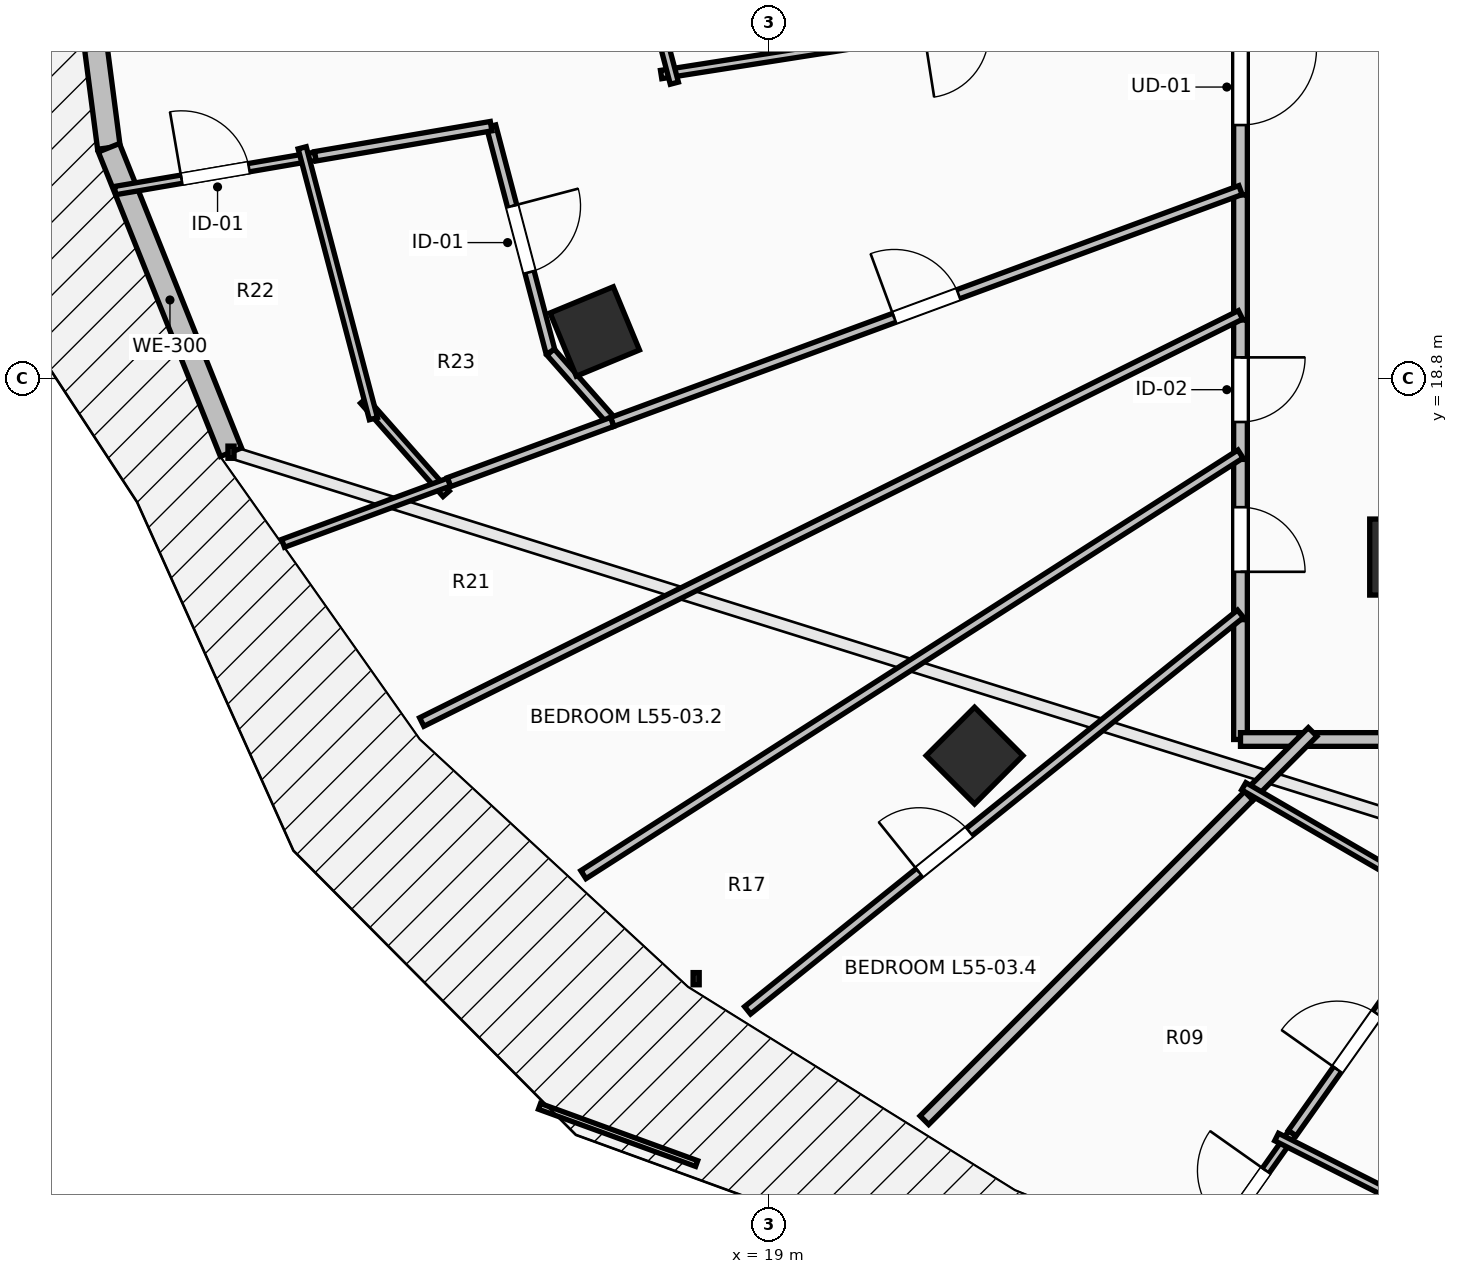
"""IFC4 building model, lengths in metres.
Left out: names, types, materials, properties, quantities, classifications, styles, units other than length and angle.
Written with IfcOpenShell. Run it as: python <this file> out.ifc"""

import sys

from ifc_helpers import new_model, si_unit, direction, frame, frame_2d, origin, origin_2d, place, context, subcontext, project, spatial, rectangle, extrude, element, fill, save


model = new_model("IFC4")
c1 = context("Model", 3, precision=1e-05, world=origin(), true_north=direction((0.0, 1.0)))
c2 = subcontext(c1, "Body", "Model", "MODEL_VIEW")
j1 = project(units=[si_unit("LENGTHUNIT", "METRE"), si_unit("PLANEANGLEUNIT", "RADIAN")], contexts=[c1])
p1 = place(None, origin())
s1 = spatial("IfcSite", under=j1, at=p1, CompositionType="ELEMENT")
p2 = place(p1, origin())
s2 = spatial("IfcBuilding", under=s1, at=p2, CompositionType="ELEMENT")
p3 = place(p2, frame((0.0, 0.0, 203.65)))
s3 = spatial("IfcBuildingStorey", under=s2, at=p3, CompositionType="ELEMENT", Elevation=203.65)
for number, where, z_axis, x_axis in (
    (1, (16.705, 19.418, 0.0), (0.0, 0.0, 1.0), (-0.924, -0.383, 0.0)),
    (2, (21.701, 13.838, 0.0), (0.0, 0.0, 1.0), (-0.707, -0.707, 0.0)),
):
    element("IfcColumn", number, at=place(p3, frame(where, z_axis=z_axis, x_axis=x_axis)), inside=s3, PredefinedType="COLUMN", context=c2, shape_type="SweptSolid", body=[
        extrude(rectangle(XDim=0.9, YDim=0.9, at=origin_2d()), origin(), (0.0, 0.0, 1.0), 3.55),
    ])
p4 = place(p3, frame((27.25, 16.45, 0.0), z_axis=(0.0, 0.0, 1.0), x_axis=(1.0, 0.0, 0.0)))
e3 = element("IfcColumn", 3, at=p4, inside=s3, PredefinedType="PILASTER", context=c2, shape_type="SweptSolid", body=[
    extrude(rectangle(XDim=0.7, YDim=1.0, at=origin_2d()), origin(), (0.0, 0.0, 1.0), 3.55),
])
p5 = place(p3, frame((9.77, 26.0, 0.0), z_axis=(0.0, 0.0, 1.0), x_axis=(0.129147853268, -0.991625348605, 0.0)))
e4 = element("IfcWall", 4, at=p5, inside=s3, PredefinedType="STANDARD", context=c2, shape_type="SweptSolid", body=[
    extrude(rectangle(XDim=4.2, YDim=0.3, at=frame_2d((2.1, 0.0))), origin(), (0.0, 0.0, 1.0), 3.29),
])
p6 = place(p5, frame((1.3, 0.0, 0.0)))
e5 = element("IfcOpeningElement", 5, at=p6, cuts=e4, PredefinedType="OPENING", context=c2, shape_type="SweptSolid", body=[
    extrude(rectangle(XDim=1.6, YDim=2.3, at=frame_2d((0.8, 1.15))), frame((0.0, 0.165, 0.0), z_axis=(0.0, -1.0, 0.0), x_axis=(1.0, 0.0, 0.0)), (0.0, 0.0, 1.0), 0.33),
])
p7 = place(p3, frame((10.312, 21.835, 0.0), z_axis=(0.0, 0.0, 1.0), x_axis=(0.372268409848, -0.928125116043, 0.0)))
e6 = element("IfcWall", 6, at=p7, inside=s3, PredefinedType="STANDARD", context=c2, shape_type="SweptSolid", body=[
    extrude(rectangle(XDim=4.315, YDim=0.3, at=frame_2d((2.158, 0.0))), origin(), (0.0, 0.0, 1.0), 3.29),
])
p8 = place(p3, frame((25.2, 24.053, 0.0), z_axis=(0.0, 0.0, 1.0), x_axis=(0.0, -1.0, 0.0)))
e7 = element("IfcWall", 7, at=p8, inside=s3, PredefinedType="PARTITIONING", context=c2, shape_type="SweptSolid", body=[
    extrude(rectangle(XDim=2.839, YDim=0.18, at=frame_2d((1.419, 0.0))), origin(), (0.0, 0.0, 1.0), 3.29),
])
p9 = place(p8, frame((0.919, 0.0, 0.0)))
e8 = element("IfcOpeningElement", 8, at=p9, cuts=e7, PredefinedType="OPENING", context=c2, shape_type="SweptSolid", body=[
    extrude(rectangle(XDim=1.0, YDim=2.15, at=frame_2d((0.5, 1.075))), frame((0.0, 0.105, 0.0), z_axis=(0.0, -1.0, 0.0), x_axis=(1.0, 0.0, 0.0)), (0.0, 0.0, 1.0), 0.21),
])
p10 = place(p3, frame((25.2, 21.214, 0.0), z_axis=(0.0, 0.0, 1.0), x_axis=(0.0, -1.0, 0.0)))
e9 = element("IfcWall", 9, at=p10, inside=s3, PredefinedType="PARTITIONING", context=c2, shape_type="SweptSolid", body=[
    extrude(rectangle(XDim=1.645, YDim=0.18, at=frame_2d((0.823, 0.0))), origin(), (0.0, 0.0, 1.0), 3.29),
])
p11 = place(p3, frame((25.2, 19.569, 0.0), z_axis=(0.0, 0.0, 1.0), x_axis=(0.0, -1.0, 0.0)))
e10 = element("IfcWall", 10, at=p11, inside=s3, PredefinedType="PARTITIONING", context=c2, shape_type="SweptSolid", body=[
    extrude(rectangle(XDim=1.834, YDim=0.18, at=frame_2d((0.917, 0.0))), origin(), (0.0, 0.0, 1.0), 3.29),
])
p12 = place(p11, frame((0.492, 0.0, 0.0)))
e11 = element("IfcOpeningElement", 11, at=p12, cuts=e10, PredefinedType="OPENING", context=c2, shape_type="SweptSolid", body=[
    extrude(rectangle(XDim=0.85, YDim=2.1, at=frame_2d((0.425, 1.05))), frame((0.0, 0.105, 0.0), z_axis=(0.0, -1.0, 0.0), x_axis=(1.0, 0.0, 0.0)), (0.0, 0.0, 1.0), 0.21),
])
p13 = place(p3, frame((25.2, 17.735, 0.0), z_axis=(0.0, 0.0, 1.0), x_axis=(0.0, -1.0, 0.0)))
e12 = element("IfcWall", 12, at=p13, inside=s3, PredefinedType="PARTITIONING", context=c2, shape_type="SweptSolid", body=[
    extrude(rectangle(XDim=2.108, YDim=0.18, at=frame_2d((1.054, 0.0))), origin(), (0.0, 0.0, 1.0), 2.482),
])
p14 = place(p13, frame((0.629, 0.0, 0.0)))
e13 = element("IfcOpeningElement", 13, at=p14, cuts=e12, PredefinedType="OPENING", context=c2, shape_type="SweptSolid", body=[
    extrude(rectangle(XDim=0.85, YDim=2.1, at=frame_2d((0.425, 1.05))), frame((0.0, 0.105, 0.0), z_axis=(0.0, -1.0, 0.0), x_axis=(1.0, 0.0, 0.0)), (0.0, 0.0, 1.0), 0.21),
])
p15 = place(p3, frame((25.2, 15.627, 0.0), z_axis=(0.0, 0.0, 1.0), x_axis=(0.0, -1.0, 0.0)))
e14 = element("IfcWall", 14, at=p15, inside=s3, PredefinedType="PARTITIONING", context=c2, shape_type="SweptSolid", body=[
    extrude(rectangle(XDim=1.577, YDim=0.18, at=frame_2d((0.789, 0.0))), origin(), (0.0, 0.0, 1.0), 2.482),
])
p16 = place(p3, frame((25.2, 14.05, 0.0), z_axis=(0.0, 0.0, 1.0), x_axis=(1.0, 0.0, 0.0)))
e15 = element("IfcWall", 15, at=p16, inside=s3, PredefinedType="PARTITIONING", context=c2, shape_type="SweptSolid", body=[
    extrude(rectangle(XDim=0.91, YDim=0.18, at=frame_2d((0.455, 0.0))), origin(), (0.0, 0.0, 1.0), 3.022),
])
p17 = place(p3, frame((25.97, 14.05, 0.0), z_axis=(0.0, 0.0, 1.0), x_axis=(1.0, 0.0, 0.0)))
e16 = element("IfcWall", 16, at=p17, inside=s3, PredefinedType="PARTITIONING", context=c2, shape_type="SweptSolid", body=[
    extrude(rectangle(XDim=3.385, YDim=0.18, at=frame_2d((1.692, 0.0))), origin(), (0.0, 0.0, 1.0), 2.482),
])
p18 = place(p3, frame((25.338, 24.015, 0.0), z_axis=(0.0, 0.0, 1.0), x_axis=(-0.987940229144, -0.154835731144, 0.0)))
e17 = element("IfcWall", 17, at=p18, inside=s3, PredefinedType="PARTITIONING", context=c2, shape_type="SweptSolid", body=[
    extrude(rectangle(XDim=7.855, YDim=0.11, at=frame_2d((3.928, 0.0))), origin(), (0.0, 0.0, 1.0), 2.936),
])
p19 = place(p18, frame((3.503, 0.0, 0.0)))
e18 = element("IfcOpeningElement", 18, at=p19, cuts=e17, PredefinedType="OPENING", context=c2, shape_type="SweptSolid", body=[
    extrude(rectangle(XDim=0.85, YDim=2.1, at=frame_2d((0.425, 1.05))), frame((0.0, 0.07, 0.0), z_axis=(0.0, -1.0, 0.0), x_axis=(1.0, 0.0, 0.0)), (0.0, 0.0, 1.0), 0.14),
])
p20 = place(p3, frame((17.752, 22.685, 0.0), z_axis=(0.0, 0.0, 1.0), x_axis=(-0.254429402158, 0.967091350038, 0.0)))
e19 = element("IfcWall", 19, at=p20, inside=s3, PredefinedType="PARTITIONING", context=c2, shape_type="SweptSolid", body=[
    extrude(rectangle(XDim=2.069, YDim=0.11, at=frame_2d((1.034, 0.0))), origin(), (0.0, 0.0, 1.0), 3.29),
])
p21 = place(p3, frame((10.394, 21.271, 0.0), z_axis=(0.0, 0.0, 1.0), x_axis=(0.985656128296, 0.168766100722, 0.0)))
e20 = element("IfcWall", 20, at=p21, inside=s3, PredefinedType="PARTITIONING", context=c2, shape_type="SweptSolid", body=[
    extrude(rectangle(XDim=2.673, YDim=0.11, at=frame_2d((1.337, 0.0))), origin(), (0.0, 0.0, 1.0), 3.29),
])
p22 = place(p21, frame((0.887, 0.0, 0.0)))
e21 = element("IfcOpeningElement", 21, at=p22, cuts=e20, PredefinedType="OPENING", context=c2, shape_type="SweptSolid", body=[
    extrude(rectangle(XDim=0.9, YDim=2.1, at=frame_2d((0.45, 1.05))), frame((0.0, 0.07, 0.0), z_axis=(0.0, -1.0, 0.0), x_axis=(1.0, 0.0, 0.0)), (0.0, 0.0, 1.0), 0.14),
])
p23 = place(p3, frame((15.341, 22.119, 0.0), z_axis=(0.0, 0.0, 1.0), x_axis=(0.254462015144, -0.967082769389, 0.0)))
e22 = element("IfcWall", 22, at=p23, inside=s3, PredefinedType="PARTITIONING", context=c2, shape_type="SweptSolid", body=[
    extrude(rectangle(XDim=3.073, YDim=0.125, at=frame_2d((1.537, 0.0))), origin(), (0.0, 0.0, 1.0), 3.29),
])
p24 = place(p23, frame((1.087, 0.0, 0.0)))
e23 = element("IfcOpeningElement", 23, at=p24, cuts=e22, PredefinedType="OPENING", context=c2, shape_type="SweptSolid", body=[
    extrude(rectangle(XDim=0.9, YDim=2.1, at=frame_2d((0.45, 1.05))), frame((0.0, 0.077, 0.0), z_axis=(0.0, -1.0, 0.0), x_axis=(1.0, 0.0, 0.0)), (0.0, 0.0, 1.0), 0.155),
])
p25 = place(p3, frame((16.123, 19.147, 0.0), z_axis=(0.0, 0.0, 1.0), x_axis=(0.66171386468, -0.749756467988, 0.0)))
e24 = element("IfcWall", 24, at=p25, inside=s3, PredefinedType="PARTITIONING", context=c2, shape_type="SweptSolid", body=[
    extrude(rectangle(XDim=1.226, YDim=0.125, at=frame_2d((0.613, 0.0))), origin(), (0.0, 0.0, 1.0), 3.29),
])
p26 = place(p3, frame((13.029, 21.723, 0.0), z_axis=(0.0, 0.0, 1.0), x_axis=(0.985629682191, 0.16892048302, 0.0)))
e25 = element("IfcWall", 25, at=p26, inside=s3, PredefinedType="PARTITIONING", context=c2, shape_type="SweptSolid", body=[
    extrude(rectangle(XDim=2.346, YDim=0.125, at=frame_2d((1.173, 0.0))), origin(), (0.0, 0.0, 1.0), 3.29),
])
p27 = place(p3, frame((16.934, 18.228, 0.0), z_axis=(0.0, 0.0, 1.0), x_axis=(0.938168899516, 0.34617786755, 0.0)))
e26 = element("IfcWall", 26, at=p27, inside=s3, PredefinedType="PARTITIONING", context=c2, shape_type="SweptSolid", body=[
    extrude(rectangle(XDim=8.811, YDim=0.125, at=frame_2d((4.405, 0.0))), origin(), (0.0, 0.0, 1.0), 2.482),
])
p28 = place(p27, frame((3.955, 0.0, 0.0)))
e27 = element("IfcOpeningElement", 27, at=p28, cuts=e26, PredefinedType="OPENING", context=c2, shape_type="SweptSolid", body=[
    extrude(rectangle(XDim=0.9, YDim=2.1, at=frame_2d((0.45, 1.05))), frame((0.0, 0.077, 0.0), z_axis=(0.0, -1.0, 0.0), x_axis=(1.0, 0.0, 0.0)), (0.0, 0.0, 1.0), 0.155),
])
p29 = place(p3, frame((14.75, 17.283, 0.0), z_axis=(0.0, 0.0, 1.0), x_axis=(-0.662345628205, 0.749198417509, 0.0)))
e28 = element("IfcWall", 28, at=p29, inside=s3, PredefinedType="PARTITIONING", context=c2, shape_type="SweptSolid", body=[
    extrude(rectangle(XDim=1.639, YDim=0.11, at=frame_2d((0.819, 0.0))), origin(), (0.0, 0.0, 1.0), 3.29),
])
p30 = place(p3, frame((13.792, 18.271, 0.0), z_axis=(0.0, 0.0, 1.0), x_axis=(-0.254271540361, 0.967132867688, 0.0)))
e29 = element("IfcWall", 29, at=p30, inside=s3, PredefinedType="PARTITIONING", context=c2, shape_type="SweptSolid", body=[
    extrude(rectangle(XDim=3.685, YDim=0.11, at=frame_2d((1.843, 0.0))), origin(), (0.0, 0.0, 1.0), 3.29),
])
p31 = place(p3, frame((12.604, 16.631, 0.0), z_axis=(0.0, 0.0, 1.0), x_axis=(0.938194450562, 0.346108614361, 0.0)))
e30 = element("IfcWall", 30, at=p31, inside=s3, PredefinedType="PARTITIONING", context=c2, shape_type="SweptSolid", body=[
    extrude(rectangle(XDim=2.328, YDim=0.11, at=frame_2d((1.164, 0.0))), origin(), (0.0, 0.0, 1.0), 3.29),
])
p32 = place(p3, frame((14.788, 17.436, 0.0), z_axis=(0.0, 0.0, 1.0), x_axis=(0.938171690747, 0.346170303003, 0.0)))
e31 = element("IfcWall", 31, at=p32, inside=s3, PredefinedType="PARTITIONING", context=c2, shape_type="SweptSolid", body=[
    extrude(rectangle(XDim=2.287, YDim=0.125, at=frame_2d((1.144, 0.0))), origin(), (0.0, 0.0, 1.0), 3.29),
])
p33 = place(p3, frame((14.428, 14.28, 0.0), z_axis=(0.0, 0.0, 1.0), x_axis=(0.895423439435, 0.44521552546, 0.0)))
e32 = element("IfcWall", 32, at=p33, inside=s3, PredefinedType="PARTITIONING", context=c2, shape_type="SweptSolid", body=[
    extrude(rectangle(XDim=12.03, YDim=0.125, at=frame_2d((6.015, 0.0))), origin(), (0.0, 0.0, 1.0), 2.482),
])
p34 = place(p3, frame((16.555, 12.272, 0.0), z_axis=(0.0, 0.0, 1.0), x_axis=(0.842221721565, 0.539131312135, 0.0)))
e33 = element("IfcWall", 33, at=p34, inside=s3, PredefinedType="PARTITIONING", context=c2, shape_type="SweptSolid", body=[
    extrude(rectangle(XDim=10.265, YDim=0.125, at=frame_2d((5.132, 0.0))), origin(), (0.0, 0.0, 1.0), 2.482),
])
p35 = place(p3, frame((18.715, 10.487, 0.0), z_axis=(0.0, 0.0, 1.0), x_axis=(0.779157389419, 0.626828335762, 0.0)))
e34 = element("IfcWall", 34, at=p35, inside=s3, PredefinedType="PARTITIONING", context=c2, shape_type="SweptSolid", body=[
    extrude(rectangle(XDim=8.323, YDim=0.125, at=frame_2d((4.162, 0.0))), origin(), (0.0, 0.0, 1.0), 2.482),
])
p36 = place(p35, frame((2.896, 0.0, 0.0)))
e35 = element("IfcOpeningElement", 35, at=p36, cuts=e34, PredefinedType="OPENING", context=c2, shape_type="SweptSolid", body=[
    extrude(rectangle(XDim=0.85, YDim=2.1, at=frame_2d((0.425, 1.05))), frame((0.0, 0.077, 0.0), z_axis=(0.0, -1.0, 0.0), x_axis=(1.0, 0.0, 0.0)), (0.0, 0.0, 1.0), 0.155),
])
p37 = place(p3, frame((21.041, 9.041, 0.0), z_axis=(0.0, 0.0, 1.0), x_axis=(0.707106781187, 0.707106781187, 0.0)))
e36 = element("IfcWall", 36, at=p37, inside=s3, PredefinedType="PARTITIONING", context=c2, shape_type="SweptSolid", body=[
    extrude(rectangle(XDim=6.176, YDim=0.16, at=frame_2d((3.088, 0.0))), origin(), (0.0, 0.0, 1.0), 2.824),
])
p38 = place(p3, frame((25.309, 13.309, 0.0), z_axis=(0.0, 0.0, 1.0), x_axis=(0.707106781187, 0.707106781187, 0.0)))
e37 = element("IfcWall", 37, at=p38, inside=s3, PredefinedType="PARTITIONING", context=c2, shape_type="SweptSolid", body=[
    extrude(rectangle(XDim=1.188, YDim=0.16, at=frame_2d((0.594, 0.0))), origin(), (0.0, 0.0, 1.0), 3.022),
])
p39 = place(p3, frame((27.568, 12.083, 0.0), z_axis=(0.0, 0.0, 1.0), x_axis=(-0.864515441931, 0.502606258082, 0.0)))
e38 = element("IfcWall", 38, at=p39, inside=s3, PredefinedType="PARTITIONING", context=c2, shape_type="SweptSolid", body=[
    extrude(rectangle(XDim=2.69, YDim=0.11, at=frame_2d((1.345, 0.0))), origin(), (0.0, 0.0, 1.0), 3.29),
])
p40 = place(p3, frame((24.666, 7.154, 0.0), z_axis=(0.0, 0.0, 1.0), x_axis=(0.577389248155, 0.816469017241, 0.0)))
e39 = element("IfcWall", 39, at=p40, inside=s3, PredefinedType="PARTITIONING", context=c2, shape_type="SweptSolid", body=[
    extrude(rectangle(XDim=2.104, YDim=0.11, at=frame_2d((1.052, 0.0))), origin(), (0.0, 0.0, 1.0), 3.29),
])
p41 = place(p40, frame((0.602, 0.0, 0.0)))
e40 = element("IfcOpeningElement", 40, at=p41, cuts=e39, PredefinedType="OPENING", context=c2, shape_type="SweptSolid", body=[
    extrude(rectangle(XDim=0.9, YDim=2.1, at=frame_2d((0.45, 1.05))), frame((0.0, 0.07, 0.0), z_axis=(0.0, -1.0, 0.0), x_axis=(1.0, 0.0, 0.0)), (0.0, 0.0, 1.0), 0.14),
])
p42 = place(p3, frame((25.881, 8.871, 0.0), z_axis=(0.0, 0.0, 1.0), x_axis=(0.577734997211, 0.816224401128, 0.0)))
e41 = element("IfcWall", 41, at=p42, inside=s3, PredefinedType="PARTITIONING", context=c2, shape_type="SweptSolid", body=[
    extrude(rectangle(XDim=2.951, YDim=0.125, at=frame_2d((1.476, 0.0))), origin(), (0.0, 0.0, 1.0), 2.824),
])
p43 = place(p42, frame((1.026, 0.0, 0.0)))
e42 = element("IfcOpeningElement", 42, at=p43, cuts=e41, PredefinedType="OPENING", context=c2, shape_type="SweptSolid", body=[
    extrude(rectangle(XDim=0.9, YDim=2.1, at=frame_2d((0.45, 1.05))), frame((0.0, 0.077, 0.0), z_axis=(0.0, -1.0, 0.0), x_axis=(1.0, 0.0, 0.0)), (0.0, 0.0, 1.0), 0.155),
])
p44 = place(p3, frame((28.083, 7.604, 0.0), z_axis=(0.0, 0.0, 1.0), x_axis=(-0.892628057427, 0.450793911999, 0.0)))
e43 = element("IfcWall", 43, at=p44, inside=s3, PredefinedType="PARTITIONING", context=c2, shape_type="SweptSolid", body=[
    extrude(rectangle(XDim=2.698, YDim=0.11, at=frame_2d((1.349, 0.0))), origin(), (0.0, 0.0, 1.0), 3.29),
])
p45 = place(p9, origin())
e44 = element("IfcDoor", 44, at=p45, inside=s3, OperationType="SINGLE_SWING_LEFT", PredefinedType="DOOR", context=c2, shape_type="SweptSolid", body=[
    extrude(rectangle(XDim=1.0, YDim=2.15, at=frame_2d((0.5, 1.075))), frame((0.0, 0.025, 0.0), z_axis=(0.0, -1.0, 0.0), x_axis=(1.0, 0.0, 0.0)), (0.0, 0.0, 1.0), 0.05),
])
fill(e8, e44)
p46 = place(p22, origin())
e45 = element("IfcDoor", 45, at=p46, inside=s3, OperationType="SINGLE_SWING_LEFT", PredefinedType="DOOR", context=c2, shape_type="SweptSolid", body=[
    extrude(rectangle(XDim=0.9, YDim=2.1, at=frame_2d((0.45, 1.05))), frame((0.0, 0.025, 0.0), z_axis=(0.0, -1.0, 0.0), x_axis=(1.0, 0.0, 0.0)), (0.0, 0.0, 1.0), 0.05),
])
fill(e21, e45)
p47 = place(p24, origin())
e46 = element("IfcDoor", 46, at=p47, inside=s3, OperationType="SINGLE_SWING_LEFT", PredefinedType="DOOR", context=c2, shape_type="SweptSolid", body=[
    extrude(rectangle(XDim=0.9, YDim=2.1, at=frame_2d((0.45, 1.05))), frame((0.0, 0.025, 0.0), z_axis=(0.0, -1.0, 0.0), x_axis=(1.0, 0.0, 0.0)), (0.0, 0.0, 1.0), 0.05),
])
fill(e23, e46)
p48 = place(p28, origin())
e47 = element("IfcDoor", 47, at=p48, inside=s3, OperationType="SINGLE_SWING_LEFT", PredefinedType="DOOR", context=c2, shape_type="SweptSolid", body=[
    extrude(rectangle(XDim=0.9, YDim=2.1, at=frame_2d((0.45, 1.05))), frame((0.0, 0.025, 0.0), z_axis=(0.0, -1.0, 0.0), x_axis=(1.0, 0.0, 0.0)), (0.0, 0.0, 1.0), 0.05),
])
fill(e27, e47)
p49 = place(p41, origin())
e48 = element("IfcDoor", 48, at=p49, inside=s3, OperationType="SINGLE_SWING_RIGHT", PredefinedType="DOOR", context=c2, shape_type="SweptSolid", body=[
    extrude(rectangle(XDim=0.9, YDim=2.1, at=frame_2d((0.45, 1.05))), frame((0.0, 0.025, 0.0), z_axis=(0.0, -1.0, 0.0), x_axis=(1.0, 0.0, 0.0)), (0.0, 0.0, 1.0), 0.05),
])
fill(e40, e48)
p50 = place(p43, origin())
e49 = element("IfcDoor", 49, at=p50, inside=s3, OperationType="SINGLE_SWING_LEFT", PredefinedType="DOOR", context=c2, shape_type="SweptSolid", body=[
    extrude(rectangle(XDim=0.9, YDim=2.1, at=frame_2d((0.45, 1.05))), frame((0.0, 0.025, 0.0), z_axis=(0.0, -1.0, 0.0), x_axis=(1.0, 0.0, 0.0)), (0.0, 0.0, 1.0), 0.05),
])
fill(e42, e49)
p51 = place(p12, origin())
e50 = element("IfcDoor", 50, at=p51, inside=s3, OperationType="SINGLE_SWING_LEFT", PredefinedType="DOOR", context=c2, shape_type="SweptSolid", body=[
    extrude(rectangle(XDim=0.85, YDim=2.1, at=frame_2d((0.425, 1.05))), frame((0.0, 0.025, 0.0), z_axis=(0.0, -1.0, 0.0), x_axis=(1.0, 0.0, 0.0)), (0.0, 0.0, 1.0), 0.05),
])
fill(e11, e50)
p52 = place(p14, origin())
e51 = element("IfcDoor", 51, at=p52, inside=s3, OperationType="SINGLE_SWING_RIGHT", PredefinedType="DOOR", context=c2, shape_type="SweptSolid", body=[
    extrude(rectangle(XDim=0.85, YDim=2.1, at=frame_2d((0.425, 1.05))), frame((0.0, 0.025, 0.0), z_axis=(0.0, -1.0, 0.0), x_axis=(1.0, 0.0, 0.0)), (0.0, 0.0, 1.0), 0.05),
])
fill(e13, e51)
p53 = place(p36, origin())
e52 = element("IfcDoor", 52, at=p53, inside=s3, OperationType="SINGLE_SWING_LEFT", PredefinedType="DOOR", context=c2, shape_type="SweptSolid", body=[
    extrude(rectangle(XDim=0.85, YDim=2.1, at=frame_2d((0.425, 1.05))), frame((0.0, 0.025, 0.0), z_axis=(0.0, -1.0, 0.0), x_axis=(1.0, 0.0, 0.0)), (0.0, 0.0, 1.0), 0.05),
])
fill(e35, e52)
save(model, sys.argv[1])
